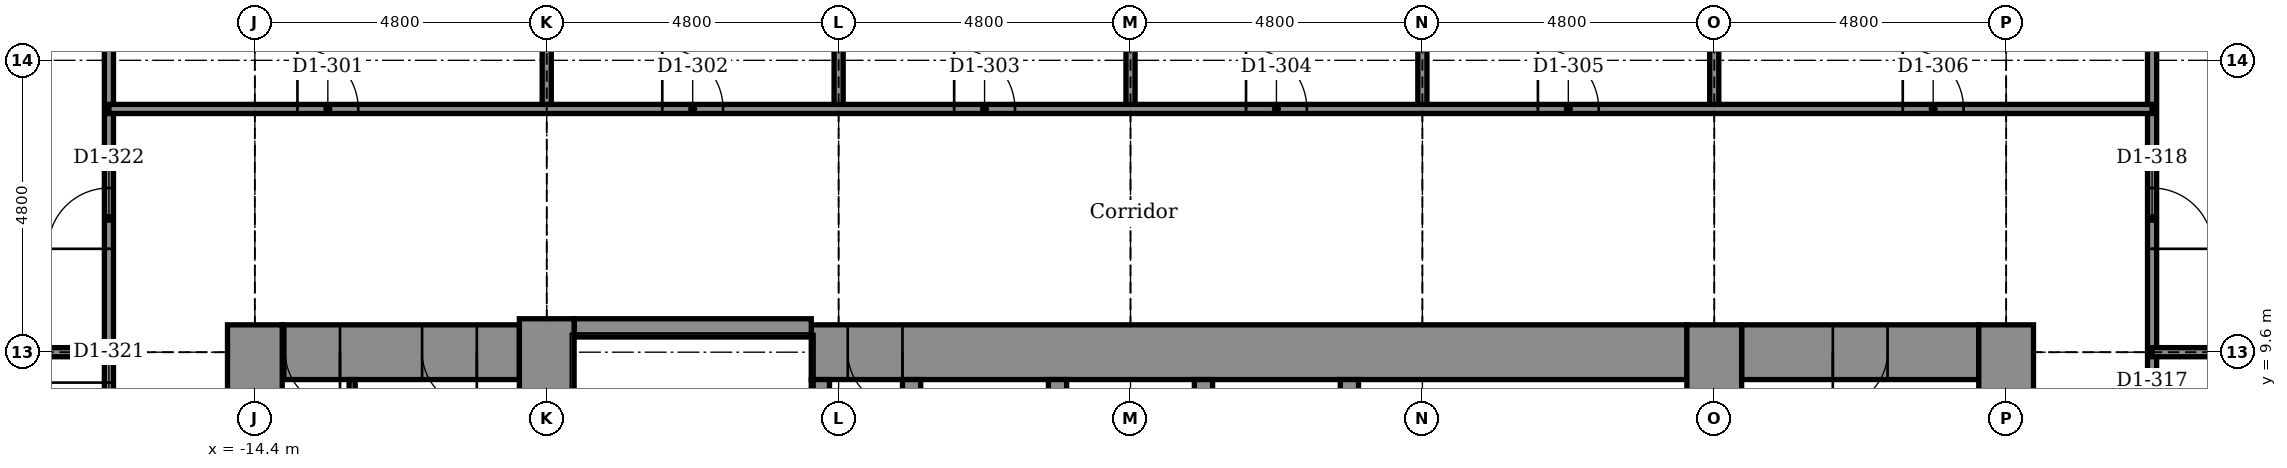
"""IFC4 building model, lengths in metres.
Left out: names, types, materials, properties, quantities, classifications, styles, units other than length and angle.
Written with IfcOpenShell. Run it as: python <this file> out.ifc"""

import sys

from ifc_helpers import new_model, si_unit, direction, frame, frame_2d, origin, place, context, subcontext, project, spatial, rectangle, extrude, element, fill, save


model = new_model("IFC4")
c1 = context("Model", 3, precision=1e-05, world=origin(), true_north=direction((0.0, 1.0)))
c2 = subcontext(c1, "Body", "Model", "MODEL_VIEW")
j1 = project(units=[si_unit("LENGTHUNIT", "METRE"), si_unit("PLANEANGLEUNIT", "RADIAN")], contexts=[c1])
p1 = place(None, origin())
s1 = spatial("IfcSite", under=j1, at=p1, CompositionType="ELEMENT")
p2 = place(p1, origin())
s2 = spatial("IfcBuilding", under=s1, at=p2, CompositionType="ELEMENT")
p3 = place(p2, frame((0.0, 0.0, 113.9)))
s3 = spatial("IfcBuildingStorey", under=s2, at=p3, CompositionType="ELEMENT", Elevation=113.9)
p4 = place(p3, frame((-13.95, 9.6, -0.2), z_axis=(0.0, 0.0, 1.0), x_axis=(1.0, 0.0, 0.0)))
e1 = element("IfcWall", 1, at=p4, inside=s3, PredefinedType="SHEAR", context=c2, shape_type="SweptSolid", body=[
    extrude(rectangle(XDim=3.9, YDim=0.9, at=frame_2d((1.95, 0.0))), origin(), (0.0, 0.0, 1.0), 4.5),
])
p5 = place(p4, frame((0.05, 0.0, 0.2)))
e2 = element("IfcOpeningElement", 2, at=p5, cuts=e1, PredefinedType="OPENING", context=c2, shape_type="SweptSolid", body=[
    extrude(rectangle(XDim=0.9, YDim=2.1, at=frame_2d((0.45, 1.05))), frame((0.0, 0.46, 0.0), z_axis=(0.0, -1.0, 0.0), x_axis=(1.0, 0.0, 0.0)), (0.0, 0.0, 1.0), 0.92),
])
p6 = place(p4, frame((2.3, 0.0, 0.2)))
e3 = element("IfcOpeningElement", 3, at=p6, cuts=e1, PredefinedType="OPENING", context=c2, shape_type="SweptSolid", body=[
    extrude(rectangle(XDim=0.9, YDim=2.1, at=frame_2d((0.45, 1.05))), frame((0.0, 0.46, 0.0), z_axis=(0.0, -1.0, 0.0), x_axis=(1.0, 0.0, 0.0)), (0.0, 0.0, 1.0), 0.92),
])
p7 = place(p3, frame((-5.25, 9.6, -0.2), z_axis=(0.0, 0.0, 1.0), x_axis=(1.0, 0.0, 0.0)))
e4 = element("IfcWall", 4, at=p7, inside=s3, PredefinedType="SHEAR", context=c2, shape_type="SweptSolid", body=[
    extrude(rectangle(XDim=14.4, YDim=0.9, at=frame_2d((7.2, 0.0))), origin(), (0.0, 0.0, 1.0), 4.5),
])
p8 = place(p7, frame((0.6, 0.0, 0.2)))
e5 = element("IfcOpeningElement", 5, at=p8, cuts=e4, PredefinedType="OPENING", context=c2, shape_type="SweptSolid", body=[
    extrude(rectangle(XDim=0.9, YDim=2.1, at=frame_2d((0.45, 1.05))), frame((0.0, 0.46, 0.0), z_axis=(0.0, -1.0, 0.0), x_axis=(1.0, 0.0, 0.0)), (0.0, 0.0, 1.0), 0.92),
])
p9 = place(p3, frame((10.05, 9.6, -0.2), z_axis=(0.0, 0.0, 1.0), x_axis=(1.0, 0.0, 0.0)))
e6 = element("IfcWall", 6, at=p9, inside=s3, PredefinedType="SHEAR", context=c2, shape_type="SweptSolid", body=[
    extrude(rectangle(XDim=3.9, YDim=0.9, at=frame_2d((1.95, 0.0))), origin(), (0.0, 0.0, 1.0), 4.5),
])
p10 = place(p9, frame((1.5, 0.0, 0.2)))
e7 = element("IfcOpeningElement", 7, at=p10, cuts=e6, PredefinedType="OPENING", context=c2, shape_type="SweptSolid", body=[
    extrude(rectangle(XDim=0.9, YDim=2.1, at=frame_2d((0.45, 1.05))), frame((0.0, 0.46, 0.0), z_axis=(0.0, -1.0, 0.0), x_axis=(1.0, 0.0, 0.0)), (0.0, 0.0, 1.0), 0.92),
])
p11 = place(p3, frame((-9.15, 10.0, -0.2), z_axis=(0.0, 0.0, 1.0), x_axis=(1.0, 0.0, 0.0)))
e8 = element("IfcWall", 8, at=p11, inside=s3, PredefinedType="STANDARD", context=c2, shape_type="SweptSolid", body=[
    extrude(rectangle(XDim=3.9, YDim=0.3, at=frame_2d((1.95, 0.0))), origin(), (0.0, 0.0, 1.0), 4.5),
])
p12 = place(p3, frame((-14.4, -10.05, -0.2), z_axis=(0.0, 0.0, 1.0), x_axis=(0.0, 1.0, 0.0)))
e9 = element("IfcWall", 9, at=p12, inside=s3, PredefinedType="SHEAR", context=c2, shape_type="SweptSolid", body=[
    extrude(rectangle(XDim=20.1, YDim=0.9, at=frame_2d((10.05, 0.0))), origin(), (0.0, 0.0, 1.0), 4.5),
])
p13 = place(p12, frame((3.5, 0.0, 0.2)))
e10 = element("IfcOpeningElement", 10, at=p13, cuts=e9, PredefinedType="OPENING", context=c2, shape_type="SweptSolid", body=[
    extrude(rectangle(XDim=1.1, YDim=2.1, at=frame_2d((0.55, 1.05))), frame((0.0, 0.46, 0.0), z_axis=(0.0, -1.0, 0.0), x_axis=(1.0, 0.0, 0.0)), (0.0, 0.0, 1.0), 0.92),
])
p14 = place(p12, frame((5.9, 0.0, 0.2)))
e11 = element("IfcOpeningElement", 11, at=p14, cuts=e9, PredefinedType="OPENING", context=c2, shape_type="SweptSolid", body=[
    extrude(rectangle(XDim=1.1, YDim=2.1, at=frame_2d((0.55, 1.05))), frame((0.0, 0.46, 0.0), z_axis=(0.0, -1.0, 0.0), x_axis=(1.0, 0.0, 0.0)), (0.0, 0.0, 1.0), 0.92),
])
p15 = place(p12, frame((8.3, 0.0, 0.2)))
e12 = element("IfcOpeningElement", 12, at=p15, cuts=e9, PredefinedType="OPENING", context=c2, shape_type="SweptSolid", body=[
    extrude(rectangle(XDim=1.1, YDim=2.1, at=frame_2d((0.55, 1.05))), frame((0.0, 0.46, 0.0), z_axis=(0.0, -1.0, 0.0), x_axis=(1.0, 0.0, 0.0)), (0.0, 0.0, 1.0), 0.92),
])
p16 = place(p12, frame((10.7, 0.0, 0.2)))
e13 = element("IfcOpeningElement", 13, at=p16, cuts=e9, PredefinedType="OPENING", context=c2, shape_type="SweptSolid", body=[
    extrude(rectangle(XDim=1.1, YDim=2.1, at=frame_2d((0.55, 1.05))), frame((0.0, 0.46, 0.0), z_axis=(0.0, -1.0, 0.0), x_axis=(1.0, 0.0, 0.0)), (0.0, 0.0, 1.0), 0.92),
])
p17 = place(p3, frame((-9.6, 2.55, -0.2), z_axis=(0.0, 0.0, 1.0), x_axis=(0.0, 1.0, 0.0)))
e14 = element("IfcWall", 14, at=p17, inside=s3, PredefinedType="SHEAR", context=c2, shape_type="SweptSolid", body=[
    extrude(rectangle(XDim=7.6, YDim=0.9, at=frame_2d((3.8, 0.0))), origin(), (0.0, 0.0, 1.0), 4.5),
])
p18 = place(p3, frame((-5.1, 2.25, -0.2), z_axis=(0.0, 0.0, 1.0), x_axis=(0.0, 1.0, 0.0)))
e15 = element("IfcWall", 15, at=p18, inside=s3, PredefinedType="STANDARD", context=c2, shape_type="SweptSolid", body=[
    extrude(rectangle(XDim=6.9, YDim=0.3, at=frame_2d((3.45, 0.0))), origin(), (0.0, 0.0, 1.0), 4.5),
])
p19 = place(p18, frame((2.0, 0.0, 0.2)))
e16 = element("IfcOpeningElement", 16, at=p19, cuts=e15, PredefinedType="OPENING", context=c2, shape_type="SweptSolid", body=[
    extrude(rectangle(XDim=1.2, YDim=2.1, at=frame_2d((0.6, 1.05))), frame((0.0, 0.16, 0.0), z_axis=(0.0, -1.0, 0.0), x_axis=(1.0, 0.0, 0.0)), (0.0, 0.0, 1.0), 0.32),
])
for number, where, z_axis, x_axis in (
    (17, (-3.6, 5.85, -0.2), (0.0, 0.0, 1.0), (0.0, 1.0, 0.0)),
    (18, (-1.2, 5.85, -0.2), (0.0, 0.0, 1.0), (0.0, 1.0, 0.0)),
    (19, (1.2, 5.85, -0.2), (0.0, 0.0, 1.0), (0.0, 1.0, 0.0)),
    (20, (3.6, 5.85, -0.2), (0.0, 0.0, 1.0), (0.0, 1.0, 0.0)),
):
    element("IfcWall", number, at=place(p3, frame(where, z_axis=z_axis, x_axis=x_axis)), inside=s3, PredefinedType="STANDARD", context=c2, shape_type="SweptSolid", body=[
        extrude(rectangle(XDim=3.3, YDim=0.3, at=frame_2d((1.65, 0.0))), origin(), (0.0, 0.0, 1.0), 4.5),
    ])
p20 = place(p3, frame((9.6, -10.15, -0.2), z_axis=(0.0, 0.0, 1.0), x_axis=(0.0, 1.0, 0.0)))
e21 = element("IfcWall", 21, at=p20, inside=s3, PredefinedType="SHEAR", context=c2, shape_type="SweptSolid", body=[
    extrude(rectangle(XDim=20.2, YDim=0.9, at=frame_2d((10.1, 0.0))), origin(), (0.0, 0.0, 1.0), 4.5),
])
p21 = place(p3, frame((14.4, -10.05, -0.2), z_axis=(0.0, 0.0, 1.0), x_axis=(0.0, 1.0, 0.0)))
e22 = element("IfcWall", 22, at=p21, inside=s3, PredefinedType="SHEAR", context=c2, shape_type="SweptSolid", body=[
    extrude(rectangle(XDim=20.1, YDim=0.9, at=frame_2d((10.05, 0.0))), origin(), (0.0, 0.0, 1.0), 4.5),
])
p22 = place(p21, frame((3.5, 0.0, 0.2)))
e23 = element("IfcOpeningElement", 23, at=p22, cuts=e22, PredefinedType="OPENING", context=c2, shape_type="SweptSolid", body=[
    extrude(rectangle(XDim=1.1, YDim=2.1, at=frame_2d((0.55, 1.05))), frame((0.0, 0.46, 0.0), z_axis=(0.0, -1.0, 0.0), x_axis=(1.0, 0.0, 0.0)), (0.0, 0.0, 1.0), 0.92),
])
p23 = place(p21, frame((5.9, 0.0, 0.2)))
e24 = element("IfcOpeningElement", 24, at=p23, cuts=e22, PredefinedType="OPENING", context=c2, shape_type="SweptSolid", body=[
    extrude(rectangle(XDim=1.1, YDim=2.1, at=frame_2d((0.55, 1.05))), frame((0.0, 0.46, 0.0), z_axis=(0.0, -1.0, 0.0), x_axis=(1.0, 0.0, 0.0)), (0.0, 0.0, 1.0), 0.92),
])
p24 = place(p21, frame((8.3, 0.0, 0.2)))
e25 = element("IfcOpeningElement", 25, at=p24, cuts=e22, PredefinedType="OPENING", context=c2, shape_type="SweptSolid", body=[
    extrude(rectangle(XDim=1.1, YDim=2.1, at=frame_2d((0.55, 1.05))), frame((0.0, 0.46, 0.0), z_axis=(0.0, -1.0, 0.0), x_axis=(1.0, 0.0, 0.0)), (0.0, 0.0, 1.0), 0.92),
])
p25 = place(p21, frame((10.7, 0.0, 0.2)))
e26 = element("IfcOpeningElement", 26, at=p25, cuts=e22, PredefinedType="OPENING", context=c2, shape_type="SweptSolid", body=[
    extrude(rectangle(XDim=1.1, YDim=2.1, at=frame_2d((0.55, 1.05))), frame((0.0, 0.46, 0.0), z_axis=(0.0, -1.0, 0.0), x_axis=(1.0, 0.0, 0.0)), (0.0, 0.0, 1.0), 0.92),
])
p26 = place(p3, frame((16.8, 3.95, 0.0), z_axis=(0.0, 0.0, 1.0), x_axis=(0.0, 1.0, 0.0)))
e27 = element("IfcWall", 27, at=p26, inside=s3, PredefinedType="PARTITIONING", context=c2, shape_type="SweptSolid", body=[
    extrude(rectangle(XDim=21.908, YDim=0.15, at=frame_2d((10.954, 0.0))), origin(), (0.0, 0.0, 1.0), 4.3),
])
p27 = place(p26, frame((0.95, 0.0, 0.0)))
e28 = element("IfcOpeningElement", 28, at=p27, cuts=e27, PredefinedType="OPENING", context=c2, shape_type="SweptSolid", body=[
    extrude(rectangle(XDim=1.0, YDim=2.1, at=frame_2d((0.5, 1.05))), frame((0.0, 0.085, 0.0), z_axis=(0.0, -1.0, 0.0), x_axis=(1.0, 0.0, 0.0)), (0.0, 0.0, 1.0), 0.17),
])
p28 = place(p26, frame((3.675, 0.0, 0.0)))
e29 = element("IfcOpeningElement", 29, at=p28, cuts=e27, PredefinedType="OPENING", context=c2, shape_type="SweptSolid", body=[
    extrude(rectangle(XDim=1.0, YDim=2.1, at=frame_2d((0.5, 1.05))), frame((0.0, 0.085, 0.0), z_axis=(0.0, -1.0, 0.0), x_axis=(1.0, 0.0, 0.0)), (0.0, 0.0, 1.0), 0.17),
])
p29 = place(p26, frame((7.35, 0.0, 0.0)))
e30 = element("IfcOpeningElement", 30, at=p29, cuts=e27, PredefinedType="OPENING", context=c2, shape_type="SweptSolid", body=[
    extrude(rectangle(XDim=1.0, YDim=2.1, at=frame_2d((0.5, 1.05))), frame((0.0, 0.085, 0.0), z_axis=(0.0, -1.0, 0.0), x_axis=(1.0, 0.0, 0.0)), (0.0, 0.0, 1.0), 0.17),
])
p30 = place(p3, frame((9.6, 13.6, 0.0), z_axis=(0.0, 0.0, 1.0), x_axis=(0.0, 1.0, 0.0)))
e31 = element("IfcWall", 31, at=p30, inside=s3, PredefinedType="PARTITIONING", context=c2, shape_type="SweptSolid", body=[
    extrude(rectangle(XDim=5.1, YDim=0.15, at=frame_2d((2.55, 0.0))), origin(), (0.0, 0.0, 1.0), 3.843),
])
p31 = place(p3, frame((4.8, 13.6, 0.0), z_axis=(0.0, 0.0, 1.0), x_axis=(0.0, 1.0, 0.0)))
e32 = element("IfcWall", 32, at=p31, inside=s3, PredefinedType="PARTITIONING", context=c2, shape_type="SweptSolid", body=[
    extrude(rectangle(XDim=13.828, YDim=0.15, at=frame_2d((6.914, 0.0))), origin(), (0.0, 0.0, 1.0), 3.843),
])
p32 = place(p3, frame((0.0, 13.6, 0.0), z_axis=(0.0, 0.0, 1.0), x_axis=(0.0, 1.0, 0.0)))
e33 = element("IfcWall", 33, at=p32, inside=s3, PredefinedType="PARTITIONING", context=c2, shape_type="SweptSolid", body=[
    extrude(rectangle(XDim=5.1, YDim=0.15, at=frame_2d((2.55, 0.0))), origin(), (0.0, 0.0, 1.0), 3.843),
])
p33 = place(p3, frame((-4.8, 13.6, 0.0), z_axis=(0.0, 0.0, 1.0), x_axis=(0.0, 1.0, 0.0)))
e34 = element("IfcWall", 34, at=p33, inside=s3, PredefinedType="PARTITIONING", context=c2, shape_type="SweptSolid", body=[
    extrude(rectangle(XDim=13.828, YDim=0.15, at=frame_2d((6.914, 0.0))), origin(), (0.0, 0.0, 1.0), 3.843),
])
p34 = place(p3, frame((-9.6, 13.6, 0.0), z_axis=(0.0, 0.0, 1.0), x_axis=(0.0, 1.0, 0.0)))
e35 = element("IfcWall", 35, at=p34, inside=s3, PredefinedType="PARTITIONING", context=c2, shape_type="SweptSolid", body=[
    extrude(rectangle(XDim=5.1, YDim=0.15, at=frame_2d((2.55, 0.0))), origin(), (0.0, 0.0, 1.0), 3.843),
])
p35 = place(p3, frame((-12.8, 7.35, 0.0), z_axis=(0.0, 0.0, 1.0), x_axis=(0.0, 1.0, 0.0)))
e36 = element("IfcWall", 36, at=p35, inside=s3, PredefinedType="PARTITIONING", context=c2, shape_type="SweptSolid", body=[
    extrude(rectangle(XDim=1.8, YDim=0.1, at=frame_2d((0.9, 0.0))), origin(), (0.0, 0.0, 1.0), 4.3),
])
p36 = place(p3, frame((-16.8, 3.95, 0.0), z_axis=(0.0, 0.0, 1.0), x_axis=(0.0, 1.0, 0.0)))
e37 = element("IfcWall", 37, at=p36, inside=s3, PredefinedType="PARTITIONING", context=c2, shape_type="SweptSolid", body=[
    extrude(rectangle(XDim=21.908, YDim=0.15, at=frame_2d((10.954, 0.0))), origin(), (0.0, 0.0, 1.0), 4.3),
])
p37 = place(p36, frame((1.25, 0.0, 0.0)))
e38 = element("IfcOpeningElement", 38, at=p37, cuts=e37, PredefinedType="OPENING", context=c2, shape_type="SweptSolid", body=[
    extrude(rectangle(XDim=1.0, YDim=2.1, at=frame_2d((0.5, 1.05))), frame((0.0, 0.085, 0.0), z_axis=(0.0, -1.0, 0.0), x_axis=(1.0, 0.0, 0.0)), (0.0, 0.0, 1.0), 0.17),
])
p38 = place(p36, frame((4.15, 0.0, 0.0)))
e39 = element("IfcOpeningElement", 39, at=p38, cuts=e37, PredefinedType="OPENING", context=c2, shape_type="SweptSolid", body=[
    extrude(rectangle(XDim=1.0, YDim=2.1, at=frame_2d((0.5, 1.05))), frame((0.0, 0.085, 0.0), z_axis=(0.0, -1.0, 0.0), x_axis=(1.0, 0.0, 0.0)), (0.0, 0.0, 1.0), 0.17),
])
p39 = place(p36, frame((7.35, 0.0, 0.0)))
e40 = element("IfcOpeningElement", 40, at=p39, cuts=e37, PredefinedType="OPENING", context=c2, shape_type="SweptSolid", body=[
    extrude(rectangle(XDim=1.0, YDim=2.1, at=frame_2d((0.5, 1.05))), frame((0.0, 0.085, 0.0), z_axis=(0.0, -1.0, 0.0), x_axis=(1.0, 0.0, 0.0)), (0.0, 0.0, 1.0), 0.17),
])
for number, where, z_axis, x_axis in (
    (41, (-18.7, 9.6, 0.0), (0.0, 0.0, 1.0), (1.0, 0.0, 0.0)),
    (42, (16.8, 9.6, 0.0), (0.0, 0.0, 1.0), (1.0, 0.0, 0.0)),
):
    element("IfcWall", number, at=place(p3, frame(where, z_axis=z_axis, x_axis=x_axis)), inside=s3, PredefinedType="PARTITIONING", context=c2, shape_type="SweptSolid", body=[
        extrude(rectangle(XDim=1.9, YDim=0.15, at=frame_2d((0.95, 0.0))), origin(), (0.0, 0.0, 1.0), 3.692),
    ])
p40 = place(p3, frame((-16.8, 13.6, 0.0), z_axis=(0.0, 0.0, 1.0), x_axis=(1.0, 0.0, 0.0)))
e43 = element("IfcWall", 43, at=p40, inside=s3, PredefinedType="PARTITIONING", context=c2, shape_type="SweptSolid", body=[
    extrude(rectangle(XDim=33.6, YDim=0.15, at=frame_2d((16.8, 0.0))), origin(), (0.0, 0.0, 1.0), 4.3),
])
p41 = place(p40, frame((3.1, 0.0, 0.0)))
e44 = element("IfcOpeningElement", 44, at=p41, cuts=e43, PredefinedType="OPENING", context=c2, shape_type="SweptSolid", body=[
    extrude(rectangle(XDim=1.0, YDim=2.1, at=frame_2d((0.5, 1.05))), frame((0.0, 0.085, 0.0), z_axis=(0.0, -1.0, 0.0), x_axis=(1.0, 0.0, 0.0)), (0.0, 0.0, 1.0), 0.17),
])
p42 = place(p40, frame((9.1, 0.0, 0.0)))
e45 = element("IfcOpeningElement", 45, at=p42, cuts=e43, PredefinedType="OPENING", context=c2, shape_type="SweptSolid", body=[
    extrude(rectangle(XDim=1.0, YDim=2.1, at=frame_2d((0.5, 1.05))), frame((0.0, 0.085, 0.0), z_axis=(0.0, -1.0, 0.0), x_axis=(1.0, 0.0, 0.0)), (0.0, 0.0, 1.0), 0.17),
])
p43 = place(p40, frame((13.9, 0.0, 0.0)))
e46 = element("IfcOpeningElement", 46, at=p43, cuts=e43, PredefinedType="OPENING", context=c2, shape_type="SweptSolid", body=[
    extrude(rectangle(XDim=1.0, YDim=2.1, at=frame_2d((0.5, 1.05))), frame((0.0, 0.085, 0.0), z_axis=(0.0, -1.0, 0.0), x_axis=(1.0, 0.0, 0.0)), (0.0, 0.0, 1.0), 0.17),
])
p44 = place(p40, frame((18.7, 0.0, 0.0)))
e47 = element("IfcOpeningElement", 47, at=p44, cuts=e43, PredefinedType="OPENING", context=c2, shape_type="SweptSolid", body=[
    extrude(rectangle(XDim=1.0, YDim=2.1, at=frame_2d((0.5, 1.05))), frame((0.0, 0.085, 0.0), z_axis=(0.0, -1.0, 0.0), x_axis=(1.0, 0.0, 0.0)), (0.0, 0.0, 1.0), 0.17),
])
p45 = place(p40, frame((23.5, 0.0, 0.0)))
e48 = element("IfcOpeningElement", 48, at=p45, cuts=e43, PredefinedType="OPENING", context=c2, shape_type="SweptSolid", body=[
    extrude(rectangle(XDim=1.0, YDim=2.1, at=frame_2d((0.5, 1.05))), frame((0.0, 0.085, 0.0), z_axis=(0.0, -1.0, 0.0), x_axis=(1.0, 0.0, 0.0)), (0.0, 0.0, 1.0), 0.17),
])
p46 = place(p40, frame((29.5, 0.0, 0.0)))
e49 = element("IfcOpeningElement", 49, at=p46, cuts=e43, PredefinedType="OPENING", context=c2, shape_type="SweptSolid", body=[
    extrude(rectangle(XDim=1.0, YDim=2.1, at=frame_2d((0.5, 1.05))), frame((0.0, 0.085, 0.0), z_axis=(0.0, -1.0, 0.0), x_axis=(1.0, 0.0, 0.0)), (0.0, 0.0, 1.0), 0.17),
])
p47 = place(p41, origin())
e50 = element("IfcDoor", 50, at=p47, inside=s3, OperationType="SINGLE_SWING_LEFT", PredefinedType="DOOR", context=c2, shape_type="SweptSolid", body=[
    extrude(rectangle(XDim=1.0, YDim=2.1, at=frame_2d((0.5, 1.05))), frame((0.0, 0.025, 0.0), z_axis=(0.0, -1.0, 0.0), x_axis=(1.0, 0.0, 0.0)), (0.0, 0.0, 1.0), 0.05),
])
fill(e44, e50)
p48 = place(p42, origin())
e51 = element("IfcDoor", 51, at=p48, inside=s3, OperationType="SINGLE_SWING_LEFT", PredefinedType="DOOR", context=c2, shape_type="SweptSolid", body=[
    extrude(rectangle(XDim=1.0, YDim=2.1, at=frame_2d((0.5, 1.05))), frame((0.0, 0.025, 0.0), z_axis=(0.0, -1.0, 0.0), x_axis=(1.0, 0.0, 0.0)), (0.0, 0.0, 1.0), 0.05),
])
fill(e45, e51)
p49 = place(p43, origin())
e52 = element("IfcDoor", 52, at=p49, inside=s3, OperationType="SINGLE_SWING_LEFT", PredefinedType="DOOR", context=c2, shape_type="SweptSolid", body=[
    extrude(rectangle(XDim=1.0, YDim=2.1, at=frame_2d((0.5, 1.05))), frame((0.0, 0.025, 0.0), z_axis=(0.0, -1.0, 0.0), x_axis=(1.0, 0.0, 0.0)), (0.0, 0.0, 1.0), 0.05),
])
fill(e46, e52)
p50 = place(p44, origin())
e53 = element("IfcDoor", 53, at=p50, inside=s3, OperationType="SINGLE_SWING_LEFT", PredefinedType="DOOR", context=c2, shape_type="SweptSolid", body=[
    extrude(rectangle(XDim=1.0, YDim=2.1, at=frame_2d((0.5, 1.05))), frame((0.0, 0.025, 0.0), z_axis=(0.0, -1.0, 0.0), x_axis=(1.0, 0.0, 0.0)), (0.0, 0.0, 1.0), 0.05),
])
fill(e47, e53)
p51 = place(p45, origin())
e54 = element("IfcDoor", 54, at=p51, inside=s3, OperationType="SINGLE_SWING_LEFT", PredefinedType="DOOR", context=c2, shape_type="SweptSolid", body=[
    extrude(rectangle(XDim=1.0, YDim=2.1, at=frame_2d((0.5, 1.05))), frame((0.0, 0.025, 0.0), z_axis=(0.0, -1.0, 0.0), x_axis=(1.0, 0.0, 0.0)), (0.0, 0.0, 1.0), 0.05),
])
fill(e48, e54)
p52 = place(p46, origin())
e55 = element("IfcDoor", 55, at=p52, inside=s3, OperationType="SINGLE_SWING_LEFT", PredefinedType="DOOR", context=c2, shape_type="SweptSolid", body=[
    extrude(rectangle(XDim=1.0, YDim=2.1, at=frame_2d((0.5, 1.05))), frame((0.0, 0.025, 0.0), z_axis=(0.0, -1.0, 0.0), x_axis=(1.0, 0.0, 0.0)), (0.0, 0.0, 1.0), 0.05),
])
fill(e49, e55)
p53 = place(p29, frame((1.0, 0.0, 0.0), z_axis=(0.0, 0.0, 1.0), x_axis=(-1.0, 0.0, 0.0)))
e56 = element("IfcDoor", 56, at=p53, inside=s3, OperationType="SINGLE_SWING_LEFT", PredefinedType="DOOR", context=c2, shape_type="SweptSolid", body=[
    extrude(rectangle(XDim=1.0, YDim=2.1, at=frame_2d((0.5, 1.05))), frame((0.0, 0.025, 0.0), z_axis=(0.0, -1.0, 0.0), x_axis=(1.0, 0.0, 0.0)), (0.0, 0.0, 1.0), 0.05),
])
fill(e30, e56)
p54 = place(p38, origin())
e57 = element("IfcDoor", 57, at=p54, inside=s3, OperationType="SINGLE_SWING_RIGHT", PredefinedType="DOOR", context=c2, shape_type="SweptSolid", body=[
    extrude(rectangle(XDim=1.0, YDim=2.1, at=frame_2d((0.5, 1.05))), frame((0.0, 0.025, 0.0), z_axis=(0.0, -1.0, 0.0), x_axis=(1.0, 0.0, 0.0)), (0.0, 0.0, 1.0), 0.05),
])
fill(e39, e57)
p55 = place(p39, origin())
e58 = element("IfcDoor", 58, at=p55, inside=s3, OperationType="SINGLE_SWING_LEFT", PredefinedType="DOOR", context=c2, shape_type="SweptSolid", body=[
    extrude(rectangle(XDim=1.0, YDim=2.1, at=frame_2d((0.5, 1.05))), frame((0.0, 0.025, 0.0), z_axis=(0.0, -1.0, 0.0), x_axis=(1.0, 0.0, 0.0)), (0.0, 0.0, 1.0), 0.05),
])
fill(e40, e58)
p56 = place(p10, frame((0.9, 0.0, 0.0), z_axis=(0.0, 0.0, 1.0), x_axis=(-1.0, 0.0, 0.0)))
e59 = element("IfcDoor", 59, at=p56, inside=s3, OperationType="SINGLE_SWING_LEFT", PredefinedType="DOOR", context=c2, shape_type="SweptSolid", body=[
    extrude(rectangle(XDim=0.9, YDim=2.1, at=frame_2d((0.45, 1.05))), frame((0.0, 0.025, 0.0), z_axis=(0.0, -1.0, 0.0), x_axis=(1.0, 0.0, 0.0)), (0.0, 0.0, 1.0), 0.05),
])
fill(e7, e59)
p57 = place(p5, frame((0.9, 0.0, 0.0), z_axis=(0.0, 0.0, 1.0), x_axis=(-1.0, 0.0, 0.0)))
e60 = element("IfcDoor", 60, at=p57, inside=s3, OperationType="SINGLE_SWING_RIGHT", PredefinedType="DOOR", context=c2, shape_type="SweptSolid", body=[
    extrude(rectangle(XDim=0.9, YDim=2.1, at=frame_2d((0.45, 1.05))), frame((0.0, 0.025, 0.0), z_axis=(0.0, -1.0, 0.0), x_axis=(1.0, 0.0, 0.0)), (0.0, 0.0, 1.0), 0.05),
])
fill(e2, e60)
p58 = place(p6, frame((0.9, 0.0, 0.0), z_axis=(0.0, 0.0, 1.0), x_axis=(-1.0, 0.0, 0.0)))
e61 = element("IfcDoor", 61, at=p58, inside=s3, OperationType="SINGLE_SWING_RIGHT", PredefinedType="DOOR", context=c2, shape_type="SweptSolid", body=[
    extrude(rectangle(XDim=0.9, YDim=2.1, at=frame_2d((0.45, 1.05))), frame((0.0, 0.025, 0.0), z_axis=(0.0, -1.0, 0.0), x_axis=(1.0, 0.0, 0.0)), (0.0, 0.0, 1.0), 0.05),
])
fill(e3, e61)
p59 = place(p8, frame((0.9, 0.0, 0.0), z_axis=(0.0, 0.0, 1.0), x_axis=(-1.0, 0.0, 0.0)))
e62 = element("IfcDoor", 62, at=p59, inside=s3, OperationType="SINGLE_SWING_RIGHT", PredefinedType="DOOR", context=c2, shape_type="SweptSolid", body=[
    extrude(rectangle(XDim=0.9, YDim=2.1, at=frame_2d((0.45, 1.05))), frame((0.0, 0.025, 0.0), z_axis=(0.0, -1.0, 0.0), x_axis=(1.0, 0.0, 0.0)), (0.0, 0.0, 1.0), 0.05),
])
fill(e5, e62)
save(model, sys.argv[1])
